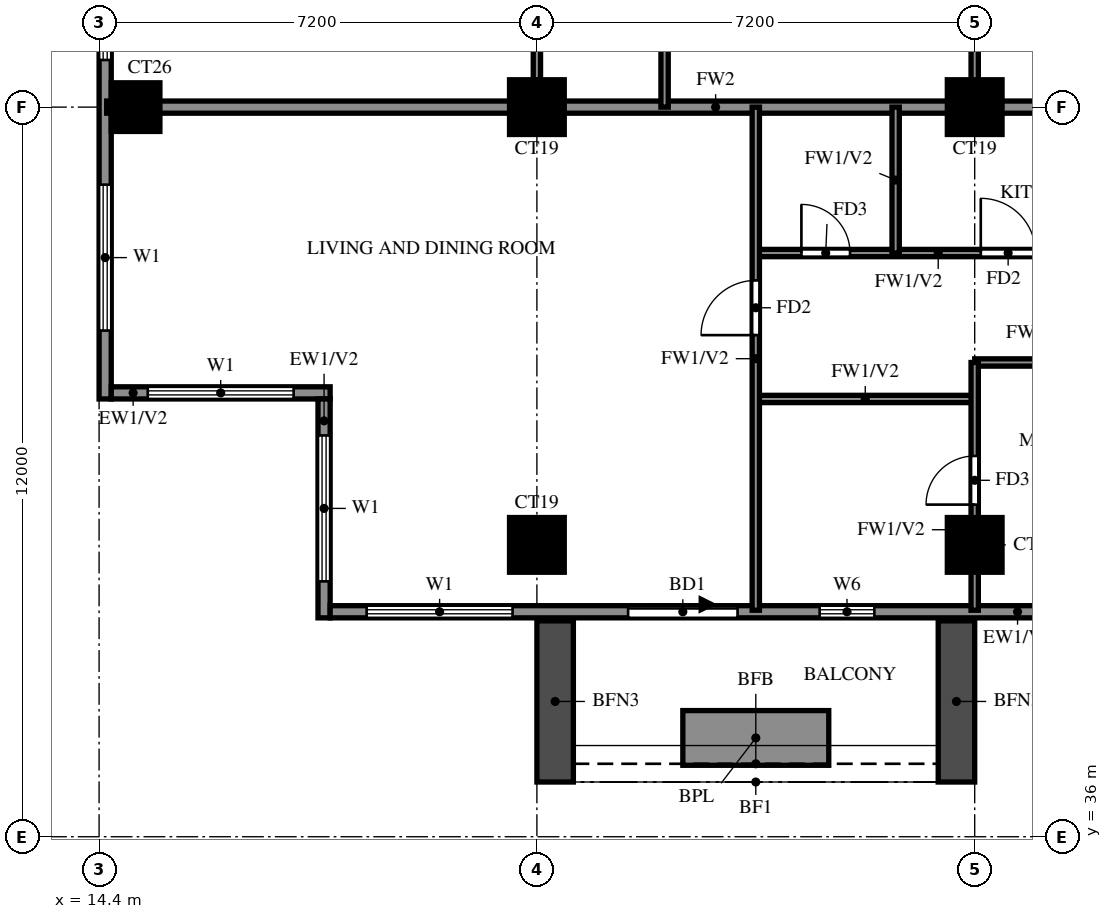
"""IFC4 building model, lengths in metres.
Left out: names, types, materials, properties, quantities, classifications, styles, units other than length and angle.
Written with IfcOpenShell. Run it as: python <this file> out.ifc"""

import sys

from ifc_helpers import new_model, si_unit, direction, frame, frame_2d, origin, origin_2d, place, context, subcontext, project, spatial, rectangle, extrude, source, transform, mapped, element, fill, save


model = new_model("IFC4")
c1 = context("Model", 3, precision=1e-05, world=origin(), true_north=direction((0.0, 1.0)))
c2 = subcontext(c1, "Body", "Model", "MODEL_VIEW")
j1 = project(units=[si_unit("LENGTHUNIT", "METRE"), si_unit("PLANEANGLEUNIT", "RADIAN")], contexts=[c1])
p1 = place(None, origin())
s1 = spatial("IfcSite", under=j1, at=p1, CompositionType="ELEMENT")
p2 = place(p1, origin())
s2 = spatial("IfcBuilding", under=s1, at=p2, CompositionType="ELEMENT")
p3 = place(p2, frame((0.0, 0.0, 188.5)))
s3 = spatial("IfcBuildingStorey", under=s2, at=p3, CompositionType="ELEMENT", Elevation=188.5)
m1 = source(origin(), c2, "Body", "SweptSolid", [
    extrude(rectangle(XDim=0.9, YDim=0.9, at=origin_2d()), origin(), (0.0, 0.0, 1.0), 3.2),
])
for number, where, z_axis, x_axis in (
    (1, (21.6, 40.8, 0.0), (0.0, 0.0, 1.0), (1.0, 0.0, 0.0)),
    (2, (28.8, 40.8, 0.0), (0.0, 0.0, 1.0), (1.0, 0.0, 0.0)),
):
    element("IfcColumn", number, at=place(p3, frame(where, z_axis=z_axis, x_axis=x_axis)), inside=s3, PredefinedType="COLUMN", context=c2, shape_type="MappedRepresentation", body=[
        mapped(m1, transform((0.0, 0.0, 0.0))),
    ])
m2 = source(origin(), c2, "Body", "SweptSolid", [
    extrude(rectangle(XDim=0.8, YDim=0.8, at=origin_2d()), origin(), (0.0, 0.0, 1.0), 3.2),
])
p4 = place(p3, frame((15.0, 48.0, 0.0), z_axis=(0.0, 0.0, 1.0), x_axis=(1.0, 0.0, 0.0)))
e3 = element("IfcColumn", 3, at=p4, inside=s3, PredefinedType="COLUMN", context=c2, shape_type="MappedRepresentation", body=[
    mapped(m2, transform((0.0, 0.0, 0.0))),
])
for number, where, z_axis, x_axis in (
    (4, (21.6, 48.0, 0.0), (0.0, 0.0, 1.0), (1.0, 0.0, 0.0)),
    (5, (28.8, 48.0, 0.0), (0.0, 0.0, 1.0), (1.0, 0.0, 0.0)),
):
    element("IfcColumn", number, at=place(p3, frame(where, z_axis=z_axis, x_axis=x_axis)), inside=s3, PredefinedType="COLUMN", context=c2, shape_type="MappedRepresentation", body=[
        mapped(m1, transform((0.0, 0.0, 0.0))),
    ])
p5 = place(p3, frame((14.5, 76.6, 0.0), z_axis=(0.0, 0.0, 1.0), x_axis=(0.0, -1.0, 0.0)))
e6 = element("IfcWall", 6, at=p5, inside=s3, PredefinedType="SOLIDWALL", context=c2, shape_type="SweptSolid", body=[
    extrude(rectangle(XDim=33.4, YDim=0.2, at=frame_2d((16.7, 0.0))), origin(), (0.0, 0.0, 1.0), 3.2),
])
p6 = place(p5, frame((15.1, 0.0, 0.0)))
e7 = element("IfcOpeningElement", 7, at=p6, cuts=e6, PredefinedType="OPENING", context=c2, shape_type="SweptSolid", body=[
    extrude(rectangle(XDim=1.8, YDim=2.4, at=frame_2d((0.9, 1.2))), frame((0.0, 0.11, 0.0), z_axis=(0.0, -1.0, 0.0), x_axis=(1.0, 0.0, 0.0)), (0.0, 0.0, 1.0), 0.22),
])
p7 = place(p5, frame((29.875, 0.0, 0.6)))
e8 = element("IfcOpeningElement", 8, at=p7, cuts=e6, PredefinedType="OPENING", context=c2, shape_type="SweptSolid", body=[
    extrude(rectangle(XDim=2.4, YDim=2.4, at=frame_2d((1.2, 1.2))), frame((0.0, 0.11, 0.0), z_axis=(0.0, -1.0, 0.0), x_axis=(1.0, 0.0, 0.0)), (0.0, 0.0, 1.0), 0.22),
])
p8 = place(p5, frame((25.425, 0.0, 0.6)))
e9 = element("IfcOpeningElement", 9, at=p8, cuts=e6, PredefinedType="OPENING", context=c2, shape_type="SweptSolid", body=[
    extrude(rectangle(XDim=2.4, YDim=2.4, at=frame_2d((1.2, 1.2))), frame((0.0, 0.11, 0.0), z_axis=(0.0, -1.0, 0.0), x_axis=(1.0, 0.0, 0.0)), (0.0, 0.0, 1.0), 0.22),
])
p9 = place(p5, frame((22.175, 0.0, 0.6)))
e10 = element("IfcOpeningElement", 10, at=p9, cuts=e6, PredefinedType="OPENING", context=c2, shape_type="SweptSolid", body=[
    extrude(rectangle(XDim=2.4, YDim=2.4, at=frame_2d((1.2, 1.2))), frame((0.0, 0.11, 0.0), z_axis=(0.0, -1.0, 0.0), x_axis=(1.0, 0.0, 0.0)), (0.0, 0.0, 1.0), 0.22),
])
p10 = place(p5, frame((19.125, 0.0, 0.6)))
e11 = element("IfcOpeningElement", 11, at=p10, cuts=e6, PredefinedType="OPENING", context=c2, shape_type="SweptSolid", body=[
    extrude(rectangle(XDim=1.8, YDim=2.4, at=frame_2d((0.9, 1.2))), frame((0.0, 0.11, 0.0), z_axis=(0.0, -1.0, 0.0), x_axis=(1.0, 0.0, 0.0)), (0.0, 0.0, 1.0), 0.22),
])
p11 = place(p5, frame((10.75, 0.0, 0.6)))
e12 = element("IfcOpeningElement", 12, at=p11, cuts=e6, PredefinedType="OPENING", context=c2, shape_type="SweptSolid", body=[
    extrude(rectangle(XDim=0.9, YDim=2.4, at=frame_2d((0.45, 1.2))), frame((0.0, 0.11, 0.0), z_axis=(0.0, -1.0, 0.0), x_axis=(1.0, 0.0, 0.0)), (0.0, 0.0, 1.0), 0.22),
])
p12 = place(p5, frame((12.525, 0.0, 0.6)))
e13 = element("IfcOpeningElement", 13, at=p12, cuts=e6, PredefinedType="OPENING", context=c2, shape_type="SweptSolid", body=[
    extrude(rectangle(XDim=1.2, YDim=2.4, at=frame_2d((0.6, 1.2))), frame((0.0, 0.11, 0.0), z_axis=(0.0, -1.0, 0.0), x_axis=(1.0, 0.0, 0.0)), (0.0, 0.0, 1.0), 0.22),
])
p13 = place(p5, frame((7.775, 0.0, 0.6)))
e14 = element("IfcOpeningElement", 14, at=p13, cuts=e6, PredefinedType="OPENING", context=c2, shape_type="SweptSolid", body=[
    extrude(rectangle(XDim=2.4, YDim=2.4, at=frame_2d((1.2, 1.2))), frame((0.0, 0.11, 0.0), z_axis=(0.0, -1.0, 0.0), x_axis=(1.0, 0.0, 0.0)), (0.0, 0.0, 1.0), 0.22),
])
p14 = place(p5, frame((3.825, 0.0, 0.6)))
e15 = element("IfcOpeningElement", 15, at=p14, cuts=e6, PredefinedType="OPENING", context=c2, shape_type="SweptSolid", body=[
    extrude(rectangle(XDim=2.4, YDim=2.4, at=frame_2d((1.2, 1.2))), frame((0.0, 0.11, 0.0), z_axis=(0.0, -1.0, 0.0), x_axis=(1.0, 0.0, 0.0)), (0.0, 0.0, 1.0), 0.22),
])
p15 = place(p5, frame((0.6, 0.0, 0.6)))
e16 = element("IfcOpeningElement", 16, at=p15, cuts=e6, PredefinedType="OPENING", context=c2, shape_type="SweptSolid", body=[
    extrude(rectangle(XDim=2.4, YDim=2.4, at=frame_2d((1.2, 1.2))), frame((0.0, 0.11, 0.0), z_axis=(0.0, -1.0, 0.0), x_axis=(1.0, 0.0, 0.0)), (0.0, 0.0, 1.0), 0.22),
])
p16 = place(p3, frame((14.6, 43.3, 0.0), z_axis=(0.0, 0.0, 1.0), x_axis=(1.0, 0.0, 0.0)))
e17 = element("IfcWall", 17, at=p16, inside=s3, PredefinedType="SOLIDWALL", context=c2, shape_type="SweptSolid", body=[
    extrude(rectangle(XDim=3.6, YDim=0.2, at=frame_2d((1.8, 0.0))), origin(), (0.0, 0.0, 1.0), 3.2),
])
p17 = place(p16, frame((0.6, 0.0, 0.6)))
e18 = element("IfcOpeningElement", 18, at=p17, cuts=e17, PredefinedType="OPENING", context=c2, shape_type="SweptSolid", body=[
    extrude(rectangle(XDim=2.4, YDim=2.4, at=frame_2d((1.2, 1.2))), frame((0.0, 0.11, 0.0), z_axis=(0.0, -1.0, 0.0), x_axis=(1.0, 0.0, 0.0)), (0.0, 0.0, 1.0), 0.22),
])
p18 = place(p3, frame((18.1, 43.2, 0.0), z_axis=(0.0, 0.0, 1.0), x_axis=(0.0, -1.0, 0.0)))
e19 = element("IfcWall", 19, at=p18, inside=s3, PredefinedType="SOLIDWALL", context=c2, shape_type="SweptSolid", body=[
    extrude(rectangle(XDim=3.6, YDim=0.2, at=frame_2d((1.8, 0.0))), origin(), (0.0, 0.0, 1.0), 3.2),
])
p19 = place(p18, frame((0.6, 0.0, 0.6)))
e20 = element("IfcOpeningElement", 20, at=p19, cuts=e19, PredefinedType="OPENING", context=c2, shape_type="SweptSolid", body=[
    extrude(rectangle(XDim=2.4, YDim=2.4, at=frame_2d((1.2, 1.2))), frame((0.0, 0.11, 0.0), z_axis=(0.0, -1.0, 0.0), x_axis=(1.0, 0.0, 0.0)), (0.0, 0.0, 1.0), 0.22),
])
p20 = place(p3, frame((18.2, 39.7, 0.0), z_axis=(0.0, 0.0, 1.0), x_axis=(1.0, 0.0, 0.0)))
e21 = element("IfcWall", 21, at=p20, inside=s3, PredefinedType="SOLIDWALL", context=c2, shape_type="SweptSolid", body=[
    extrude(rectangle(XDim=23.8, YDim=0.2, at=frame_2d((11.9, 0.0))), origin(), (0.0, 0.0, 1.0), 3.2),
])
p21 = place(p20, frame((4.9, 0.0, 0.0)))
e22 = element("IfcOpeningElement", 22, at=p21, cuts=e21, PredefinedType="OPENING", context=c2, shape_type="SweptSolid", body=[
    extrude(rectangle(XDim=1.8, YDim=2.4, at=frame_2d((0.9, 1.2))), frame((0.0, 0.11, 0.0), z_axis=(0.0, -1.0, 0.0), x_axis=(1.0, 0.0, 0.0)), (0.0, 0.0, 1.0), 0.22),
])
p22 = place(p20, frame((0.6, 0.0, 0.6)))
e23 = element("IfcOpeningElement", 23, at=p22, cuts=e21, PredefinedType="OPENING", context=c2, shape_type="SweptSolid", body=[
    extrude(rectangle(XDim=2.4, YDim=2.4, at=frame_2d((1.2, 1.2))), frame((0.0, 0.11, 0.0), z_axis=(0.0, -1.0, 0.0), x_axis=(1.0, 0.0, 0.0)), (0.0, 0.0, 1.0), 0.22),
])
p23 = place(p20, frame((11.8, 0.0, 0.6)))
e24 = element("IfcOpeningElement", 24, at=p23, cuts=e21, PredefinedType="OPENING", context=c2, shape_type="SweptSolid", body=[
    extrude(rectangle(XDim=2.4, YDim=2.4, at=frame_2d((1.2, 1.2))), frame((0.0, 0.11, 0.0), z_axis=(0.0, -1.0, 0.0), x_axis=(1.0, 0.0, 0.0)), (0.0, 0.0, 1.0), 0.22),
])
p24 = place(p20, frame((8.05, 0.0, 1.5)))
e25 = element("IfcOpeningElement", 25, at=p24, cuts=e21, PredefinedType="OPENING", context=c2, shape_type="SweptSolid", body=[
    extrude(rectangle(XDim=0.9, YDim=0.9, at=frame_2d((0.45, 0.45))), frame((0.0, 0.11, 0.0), z_axis=(0.0, -1.0, 0.0), x_axis=(1.0, 0.0, 0.0)), (0.0, 0.0, 1.0), 0.22),
])
for number, where, z_axis, x_axis in (
    (26, (21.9, 39.55, 0.0), (0.0, 0.0, 1.0), (0.0, -1.0, 0.0)),
    (27, (28.5, 39.55, 0.0), (0.0, 0.0, 1.0), (0.0, -1.0, 0.0)),
):
    element("IfcWall", number, at=place(p3, frame(where, z_axis=z_axis, x_axis=x_axis)), inside=s3, PredefinedType="SOLIDWALL", context=c2, shape_type="SweptSolid", body=[
        extrude(rectangle(XDim=2.65, YDim=0.6, at=frame_2d((1.325, 0.0))), origin(), (0.0, 0.0, 1.0), 2.85),
    ])
p25 = place(p3, frame((24.0, 37.625, 0.0), z_axis=(0.0, 0.0, 1.0), x_axis=(1.0, 0.0, 0.0)))
e28 = element("IfcWall", 28, at=p25, inside=s3, PredefinedType="SOLIDWALL", context=c2, shape_type="SweptSolid", body=[
    extrude(rectangle(XDim=2.4, YDim=0.9, at=frame_2d((1.2, 0.0))), origin(), (0.0, 0.0, 1.0), 0.9),
])
p26 = place(p3, frame((14.525, 48.0, 0.0), z_axis=(0.0, 0.0, 1.0), x_axis=(1.0, 0.0, 0.0)))
e29 = element("IfcWall", 29, at=p26, inside=s3, PredefinedType="SOLIDWALL", context=c2, shape_type="SweptSolid", body=[
    extrude(rectangle(XDim=19.075, YDim=0.2, at=frame_2d((9.538, 0.0))), origin(), (0.0, 0.0, 1.0), 3.2),
])
p27 = place(p3, frame((25.2, 43.2, 0.0), z_axis=(0.0, 0.0, 1.0), x_axis=(1.0, 0.0, 0.0)))
e30 = element("IfcWall", 30, at=p27, inside=s3, PredefinedType="PARTITIONING", context=c2, shape_type="SweptSolid", body=[
    extrude(rectangle(XDim=3.6, YDim=0.12, at=frame_2d((1.8, 0.0))), origin(), (0.0, 0.0, 1.0), 3.2),
])
p28 = place(p3, frame((28.8, 43.8, 0.0), z_axis=(0.0, 0.0, 1.0), x_axis=(1.0, 0.0, 0.0)))
e31 = element("IfcWall", 31, at=p28, inside=s3, PredefinedType="PARTITIONING", context=c2, shape_type="SweptSolid", body=[
    extrude(rectangle(XDim=4.8, YDim=0.12, at=frame_2d((2.4, 0.0))), origin(), (0.0, 0.0, 1.0), 3.2),
])
p29 = place(p28, frame((1.95, 0.0, 0.0)))
e32 = element("IfcOpeningElement", 32, at=p29, cuts=e31, PredefinedType="OPENING", context=c2, shape_type="SweptSolid", body=[
    extrude(rectangle(XDim=0.9, YDim=2.1, at=frame_2d((0.45, 1.05))), frame((0.0, 0.07, 0.0), z_axis=(0.0, -1.0, 0.0), x_axis=(1.0, 0.0, 0.0)), (0.0, 0.0, 1.0), 0.14),
])
p30 = place(p3, frame((25.2, 45.6, 0.0), z_axis=(0.0, 0.0, 1.0), x_axis=(1.0, 0.0, 0.0)))
e33 = element("IfcWall", 33, at=p30, inside=s3, PredefinedType="PARTITIONING", context=c2, shape_type="SweptSolid", body=[
    extrude(rectangle(XDim=6.0, YDim=0.12, at=frame_2d((3.0, 0.0))), origin(), (0.0, 0.0, 1.0), 3.2),
])
p31 = place(p30, frame((0.75, 0.0, 0.0)))
e34 = element("IfcOpeningElement", 34, at=p31, cuts=e33, PredefinedType="OPENING", context=c2, shape_type="SweptSolid", body=[
    extrude(rectangle(XDim=0.8, YDim=2.1, at=frame_2d((0.4, 1.05))), frame((0.0, 0.07, 0.0), z_axis=(0.0, -1.0, 0.0), x_axis=(1.0, 0.0, 0.0)), (0.0, 0.0, 1.0), 0.14),
])
p32 = place(p30, frame((3.7, 0.0, 0.0)))
e35 = element("IfcOpeningElement", 35, at=p32, cuts=e33, PredefinedType="OPENING", context=c2, shape_type="SweptSolid", body=[
    extrude(rectangle(XDim=0.9, YDim=2.1, at=frame_2d((0.45, 1.05))), frame((0.0, 0.07, 0.0), z_axis=(0.0, -1.0, 0.0), x_axis=(1.0, 0.0, 0.0)), (0.0, 0.0, 1.0), 0.14),
])
p33 = place(p3, frame((21.6, 48.0, 0.0), z_axis=(0.0, 0.0, 1.0), x_axis=(0.0, 1.0, 0.0)))
e36 = element("IfcWall", 36, at=p33, inside=s3, PredefinedType="PARTITIONING", context=c2, shape_type="SweptSolid", body=[
    extrude(rectangle(XDim=25.2, YDim=0.12, at=frame_2d((12.6, 0.0))), origin(), (0.0, 0.0, 1.0), 3.2),
])
p34 = place(p33, frame((1.35, 0.0, 0.0)))
e37 = element("IfcOpeningElement", 37, at=p34, cuts=e36, PredefinedType="OPENING", context=c2, shape_type="SweptSolid", body=[
    extrude(rectangle(XDim=0.9, YDim=2.1, at=frame_2d((0.45, 1.05))), frame((0.0, 0.07, 0.0), z_axis=(0.0, -1.0, 0.0), x_axis=(1.0, 0.0, 0.0)), (0.0, 0.0, 1.0), 0.14),
])
p35 = place(p33, frame((4.95, 0.0, 0.0)))
e38 = element("IfcOpeningElement", 38, at=p35, cuts=e36, PredefinedType="OPENING", context=c2, shape_type="SweptSolid", body=[
    extrude(rectangle(XDim=0.9, YDim=2.1, at=frame_2d((0.45, 1.05))), frame((0.0, 0.07, 0.0), z_axis=(0.0, -1.0, 0.0), x_axis=(1.0, 0.0, 0.0)), (0.0, 0.0, 1.0), 0.14),
])
p36 = place(p33, frame((8.25, 0.0, 0.0)))
e39 = element("IfcOpeningElement", 39, at=p36, cuts=e36, PredefinedType="OPENING", context=c2, shape_type="SweptSolid", body=[
    extrude(rectangle(XDim=1.5, YDim=2.1, at=frame_2d((0.75, 1.05))), frame((0.0, 0.07, 0.0), z_axis=(0.0, -1.0, 0.0), x_axis=(1.0, 0.0, 0.0)), (0.0, 0.0, 1.0), 0.14),
])
p37 = place(p33, frame((12.15, 0.0, 0.0)))
e40 = element("IfcOpeningElement", 40, at=p37, cuts=e36, PredefinedType="OPENING", context=c2, shape_type="SweptSolid", body=[
    extrude(rectangle(XDim=0.9, YDim=2.1, at=frame_2d((0.45, 1.05))), frame((0.0, 0.07, 0.0), z_axis=(0.0, -1.0, 0.0), x_axis=(1.0, 0.0, 0.0)), (0.0, 0.0, 1.0), 0.14),
])
p38 = place(p33, frame((15.75, 0.0, 0.0)))
e41 = element("IfcOpeningElement", 41, at=p38, cuts=e36, PredefinedType="OPENING", context=c2, shape_type="SweptSolid", body=[
    extrude(rectangle(XDim=0.9, YDim=2.1, at=frame_2d((0.45, 1.05))), frame((0.0, 0.07, 0.0), z_axis=(0.0, -1.0, 0.0), x_axis=(1.0, 0.0, 0.0)), (0.0, 0.0, 1.0), 0.14),
])
p39 = place(p33, frame((19.35, 0.0, 0.0)))
e42 = element("IfcOpeningElement", 42, at=p39, cuts=e36, PredefinedType="OPENING", context=c2, shape_type="SweptSolid", body=[
    extrude(rectangle(XDim=0.9, YDim=2.1, at=frame_2d((0.45, 1.05))), frame((0.0, 0.07, 0.0), z_axis=(0.0, -1.0, 0.0), x_axis=(1.0, 0.0, 0.0)), (0.0, 0.0, 1.0), 0.14),
])
p40 = place(p33, frame((22.95, 0.0, 0.0)))
e43 = element("IfcOpeningElement", 43, at=p40, cuts=e36, PredefinedType="OPENING", context=c2, shape_type="SweptSolid", body=[
    extrude(rectangle(XDim=0.9, YDim=2.1, at=frame_2d((0.45, 1.05))), frame((0.0, 0.07, 0.0), z_axis=(0.0, -1.0, 0.0), x_axis=(1.0, 0.0, 0.0)), (0.0, 0.0, 1.0), 0.14),
])
p41 = place(p3, frame((23.7, 48.0, 0.0), z_axis=(0.0, 0.0, 1.0), x_axis=(0.0, 1.0, 0.0)))
e44 = element("IfcWall", 44, at=p41, inside=s3, PredefinedType="PARTITIONING", context=c2, shape_type="SweptSolid", body=[
    extrude(rectangle(XDim=3.6, YDim=0.12, at=frame_2d((1.8, 0.0))), origin(), (0.0, 0.0, 1.0), 3.2),
])
p42 = place(p3, frame((25.2, 39.725, 0.0), z_axis=(0.0, 0.0, 1.0), x_axis=(0.0, 1.0, 0.0)))
e45 = element("IfcWall", 45, at=p42, inside=s3, PredefinedType="PARTITIONING", context=c2, shape_type="SweptSolid", body=[
    extrude(rectangle(XDim=8.275, YDim=0.12, at=frame_2d((4.137, 0.0))), origin(), (0.0, 0.0, 1.0), 3.2),
])
p43 = place(p42, frame((4.525, 0.0, 0.0)))
e46 = element("IfcOpeningElement", 46, at=p43, cuts=e45, PredefinedType="OPENING", context=c2, shape_type="SweptSolid", body=[
    extrude(rectangle(XDim=0.9, YDim=2.1, at=frame_2d((0.45, 1.05))), frame((0.0, 0.07, 0.0), z_axis=(0.0, -1.0, 0.0), x_axis=(1.0, 0.0, 0.0)), (0.0, 0.0, 1.0), 0.14),
])
p44 = place(p3, frame((27.5, 45.6, 0.0), z_axis=(0.0, 0.0, 1.0), x_axis=(0.0, 1.0, 0.0)))
e47 = element("IfcWall", 47, at=p44, inside=s3, PredefinedType="PARTITIONING", context=c2, shape_type="SweptSolid", body=[
    extrude(rectangle(XDim=2.4, YDim=0.12, at=frame_2d((1.2, 0.0))), origin(), (0.0, 0.0, 1.0), 3.2),
])
p45 = place(p3, frame((28.8, 39.725, 0.0), z_axis=(0.0, 0.0, 1.0), x_axis=(0.0, 1.0, 0.0)))
e48 = element("IfcWall", 48, at=p45, inside=s3, PredefinedType="PARTITIONING", context=c2, shape_type="SweptSolid", body=[
    extrude(rectangle(XDim=4.075, YDim=0.12, at=frame_2d((2.038, 0.0))), origin(), (0.0, 0.0, 1.0), 3.2),
])
p46 = place(p45, frame((1.738, 0.0, 0.0)))
e49 = element("IfcOpeningElement", 49, at=p46, cuts=e48, PredefinedType="OPENING", context=c2, shape_type="SweptSolid", body=[
    extrude(rectangle(XDim=0.8, YDim=2.1, at=frame_2d((0.4, 1.05))), frame((0.0, 0.07, 0.0), z_axis=(0.0, -1.0, 0.0), x_axis=(1.0, 0.0, 0.0)), (0.0, 0.0, 1.0), 0.14),
])
p47 = place(p3, frame((28.8, 48.0, 0.0), z_axis=(0.0, 0.0, 1.0), x_axis=(0.0, 1.0, 0.0)))
e50 = element("IfcWall", 50, at=p47, inside=s3, PredefinedType="PARTITIONING", context=c2, shape_type="SweptSolid", body=[
    extrude(rectangle(XDim=3.6, YDim=0.12, at=frame_2d((1.8, 0.0))), origin(), (0.0, 0.0, 1.0), 3.2),
])
p48 = place(p7, origin())
e51 = element("IfcWindow", 51, at=p48, inside=s3, PartitioningType="DOUBLE_PANEL_VERTICAL", PredefinedType="WINDOW", context=c2, shape_type="SweptSolid", body=[
    extrude(rectangle(XDim=2.4, YDim=2.4, at=frame_2d((1.2, 1.2))), frame((0.0, 0.03, 0.0), z_axis=(0.0, -1.0, 0.0), x_axis=(1.0, 0.0, 0.0)), (0.0, 0.0, 1.0), 0.06),
])
fill(e8, e51)
p49 = place(p8, origin())
e52 = element("IfcWindow", 52, at=p49, inside=s3, PartitioningType="DOUBLE_PANEL_VERTICAL", PredefinedType="WINDOW", context=c2, shape_type="SweptSolid", body=[
    extrude(rectangle(XDim=2.4, YDim=2.4, at=frame_2d((1.2, 1.2))), frame((0.0, 0.03, 0.0), z_axis=(0.0, -1.0, 0.0), x_axis=(1.0, 0.0, 0.0)), (0.0, 0.0, 1.0), 0.06),
])
fill(e9, e52)
p50 = place(p17, origin())
e53 = element("IfcWindow", 53, at=p50, inside=s3, PartitioningType="DOUBLE_PANEL_VERTICAL", PredefinedType="WINDOW", context=c2, shape_type="SweptSolid", body=[
    extrude(rectangle(XDim=2.4, YDim=2.4, at=frame_2d((1.2, 1.2))), frame((0.0, 0.03, 0.0), z_axis=(0.0, -1.0, 0.0), x_axis=(1.0, 0.0, 0.0)), (0.0, 0.0, 1.0), 0.06),
])
fill(e18, e53)
p51 = place(p19, origin())
e54 = element("IfcWindow", 54, at=p51, inside=s3, PartitioningType="DOUBLE_PANEL_VERTICAL", PredefinedType="WINDOW", context=c2, shape_type="SweptSolid", body=[
    extrude(rectangle(XDim=2.4, YDim=2.4, at=frame_2d((1.2, 1.2))), frame((0.0, 0.03, 0.0), z_axis=(0.0, -1.0, 0.0), x_axis=(1.0, 0.0, 0.0)), (0.0, 0.0, 1.0), 0.06),
])
fill(e20, e54)
p52 = place(p21, origin())
e55 = element("IfcDoor", 55, at=p52, inside=s3, OperationType="DOUBLE_DOOR_SLIDING", PredefinedType="DOOR", context=c2, shape_type="SweptSolid", body=[
    extrude(rectangle(XDim=1.8, YDim=2.4, at=frame_2d((0.9, 1.2))), frame((0.0, 0.025, 0.0), z_axis=(0.0, -1.0, 0.0), x_axis=(1.0, 0.0, 0.0)), (0.0, 0.0, 1.0), 0.05),
])
fill(e22, e55)
p53 = place(p22, origin())
e56 = element("IfcWindow", 56, at=p53, inside=s3, PartitioningType="DOUBLE_PANEL_VERTICAL", PredefinedType="WINDOW", context=c2, shape_type="SweptSolid", body=[
    extrude(rectangle(XDim=2.4, YDim=2.4, at=frame_2d((1.2, 1.2))), frame((0.0, 0.03, 0.0), z_axis=(0.0, -1.0, 0.0), x_axis=(1.0, 0.0, 0.0)), (0.0, 0.0, 1.0), 0.06),
])
fill(e23, e56)
p54 = place(p24, origin())
e57 = element("IfcWindow", 57, at=p54, inside=s3, PartitioningType="SINGLE_PANEL", PredefinedType="WINDOW", context=c2, shape_type="SweptSolid", body=[
    extrude(rectangle(XDim=0.9, YDim=0.9, at=frame_2d((0.45, 0.45))), frame((0.0, 0.03, 0.0), z_axis=(0.0, -1.0, 0.0), x_axis=(1.0, 0.0, 0.0)), (0.0, 0.0, 1.0), 0.06),
])
fill(e25, e57)
p55 = place(p43, origin())
e58 = element("IfcDoor", 58, at=p55, inside=s3, OperationType="SINGLE_SWING_RIGHT", PredefinedType="DOOR", context=c2, shape_type="SweptSolid", body=[
    extrude(rectangle(XDim=0.9, YDim=2.1, at=frame_2d((0.45, 1.05))), frame((0.0, 0.025, 0.0), z_axis=(0.0, -1.0, 0.0), x_axis=(1.0, 0.0, 0.0)), (0.0, 0.0, 1.0), 0.05),
])
fill(e46, e58)
p56 = place(p46, origin())
e59 = element("IfcDoor", 59, at=p56, inside=s3, OperationType="SINGLE_SWING_RIGHT", PredefinedType="DOOR", context=c2, shape_type="SweptSolid", body=[
    extrude(rectangle(XDim=0.8, YDim=2.1, at=frame_2d((0.4, 1.05))), frame((0.0, 0.025, 0.0), z_axis=(0.0, -1.0, 0.0), x_axis=(1.0, 0.0, 0.0)), (0.0, 0.0, 1.0), 0.05),
])
fill(e49, e59)
p57 = place(p31, origin())
e60 = element("IfcDoor", 60, at=p57, inside=s3, OperationType="SINGLE_SWING_RIGHT", PredefinedType="DOOR", context=c2, shape_type="SweptSolid", body=[
    extrude(rectangle(XDim=0.8, YDim=2.1, at=frame_2d((0.4, 1.05))), frame((0.0, 0.025, 0.0), z_axis=(0.0, -1.0, 0.0), x_axis=(1.0, 0.0, 0.0)), (0.0, 0.0, 1.0), 0.05),
])
fill(e34, e60)
p58 = place(p32, origin())
e61 = element("IfcDoor", 61, at=p58, inside=s3, OperationType="SINGLE_SWING_LEFT", PredefinedType="DOOR", context=c2, shape_type="SweptSolid", body=[
    extrude(rectangle(XDim=0.9, YDim=2.1, at=frame_2d((0.45, 1.05))), frame((0.0, 0.025, 0.0), z_axis=(0.0, -1.0, 0.0), x_axis=(1.0, 0.0, 0.0)), (0.0, 0.0, 1.0), 0.05),
])
fill(e35, e61)
save(model, sys.argv[1])
